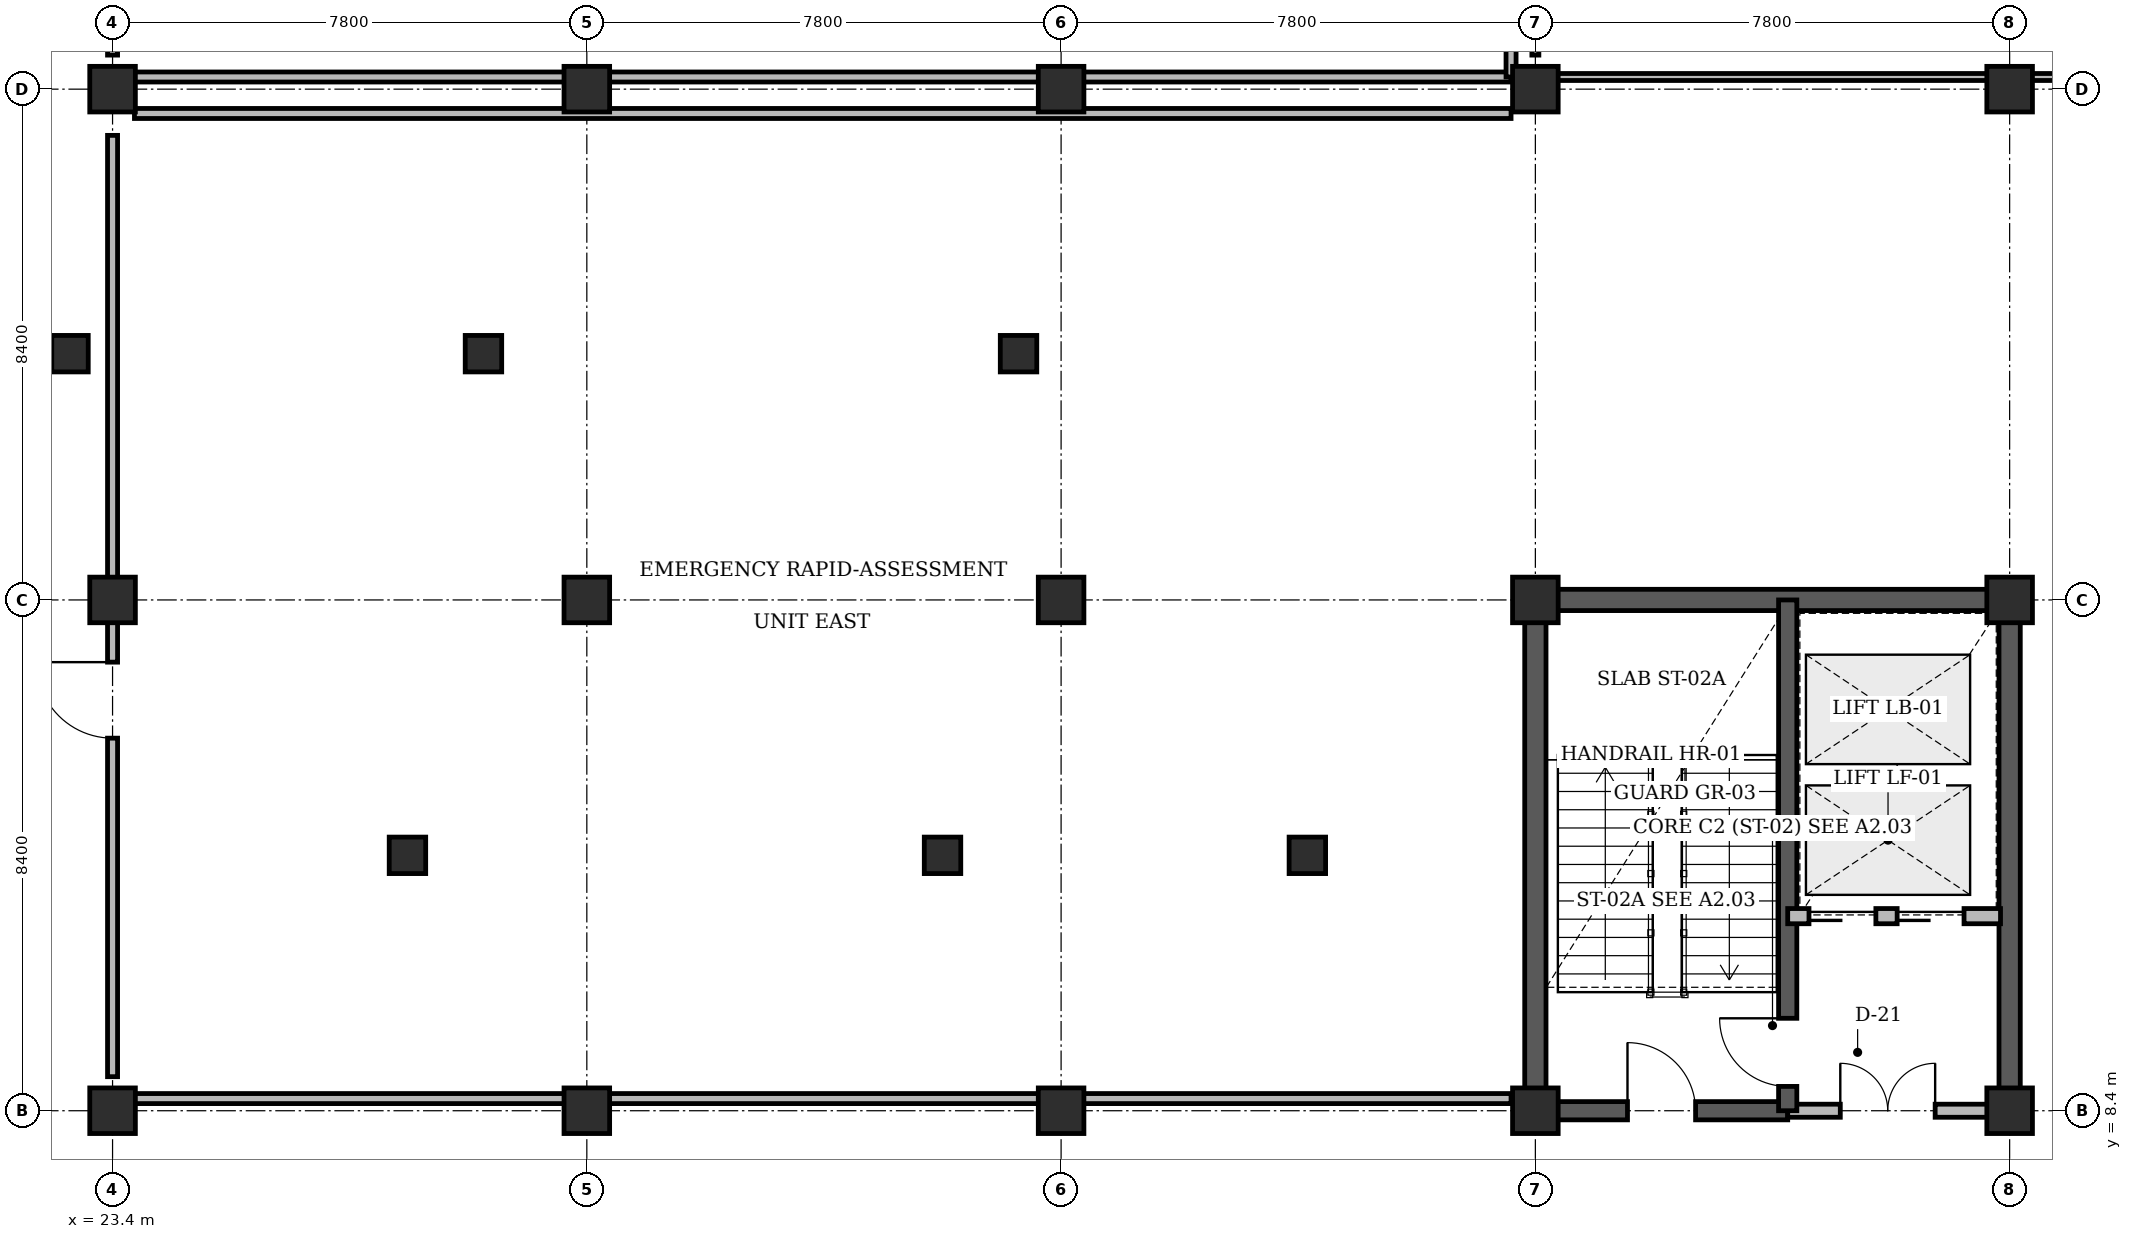
"""IFC4 building model, lengths in metres.
Left out: names, types, materials, properties, quantities, classifications, styles, units other than length and angle.
Written with IfcOpenShell. Run it as: python <this file> out.ifc"""

import sys

from ifc_helpers import new_model, si_unit, direction, frame, frame_2d, origin, origin_2d, place, context, subcontext, project, spatial, rectangle, circle, extrude, element, fill, save


model = new_model("IFC4")
c1 = context("Model", 3, precision=1e-05, world=origin(), true_north=direction((0.0, 1.0)))
c2 = subcontext(c1, "Body", "Model", "MODEL_VIEW")
j1 = project(units=[si_unit("LENGTHUNIT", "METRE"), si_unit("PLANEANGLEUNIT", "RADIAN")], contexts=[c1])
p1 = place(None, origin())
s1 = spatial("IfcSite", under=j1, at=p1, CompositionType="ELEMENT")
p2 = place(p1, origin())
s2 = spatial("IfcBuilding", under=s1, at=p2, CompositionType="ELEMENT")
p3 = place(p2, frame((0.0, 0.0, 4.8)))
s3 = spatial("IfcBuildingStorey", under=s2, at=p3, CompositionType="ELEMENT", Elevation=4.8)
p4 = place(p3, frame((46.625, 16.8, 0.0), z_axis=(0.0, 0.0, 1.0), x_axis=(1.0, 0.0, 0.0)))
e1 = element("IfcWall", 1, at=p4, inside=s3, PredefinedType="SHEAR", context=c2, shape_type="SweptSolid", body=[
    extrude(rectangle(XDim=8.15, YDim=0.35, at=frame_2d((4.075, 0.0))), origin(), (0.0, 0.0, 1.0), 4.48),
])
for number, where, z_axis, x_axis in (
    (2, (46.8, 8.4, 0.0), (0.0, 0.0, 1.0), (0.0, 1.0, 0.0)),
    (3, (54.6, 8.4, 0.0), (0.0, 0.0, 1.0), (0.0, 1.0, 0.0)),
):
    element("IfcWall", number, at=place(p3, frame(where, z_axis=z_axis, x_axis=x_axis)), inside=s3, PredefinedType="SHEAR", context=c2, shape_type="SweptSolid", body=[
        extrude(rectangle(XDim=8.4, YDim=0.35, at=frame_2d((4.2, 0.0))), origin(), (0.0, 0.0, 1.0), 4.48),
    ])
for number, where, z_axis, x_axis in (
    (4, (23.4, 8.4, 0.0), (0.0, 0.0, 1.0), (1.0, 0.0, 0.0)),
    (5, (23.4, 16.8, 0.0), (0.0, 0.0, 1.0), (1.0, 0.0, 0.0)),
    (6, (23.4, 25.2, 0.0), (0.0, 0.0, 1.0), (1.0, 0.0, 0.0)),
    (7, (31.2, 8.4, 0.0), (0.0, 0.0, 1.0), (1.0, 0.0, 0.0)),
    (8, (31.2, 16.8, 0.0), (0.0, 0.0, 1.0), (1.0, 0.0, 0.0)),
    (9, (31.2, 25.2, 0.0), (0.0, 0.0, 1.0), (1.0, 0.0, 0.0)),
    (10, (39.0, 8.4, 0.0), (0.0, 0.0, 1.0), (1.0, 0.0, 0.0)),
    (11, (39.0, 16.8, 0.0), (0.0, 0.0, 1.0), (1.0, 0.0, 0.0)),
    (12, (39.0, 25.2, 0.0), (0.0, 0.0, 1.0), (1.0, 0.0, 0.0)),
    (13, (46.8, 8.4, 0.0), (0.0, 0.0, 1.0), (1.0, 0.0, 0.0)),
    (14, (46.8, 16.8, 0.0), (0.0, 0.0, 1.0), (1.0, 0.0, 0.0)),
    (15, (46.8, 25.2, 0.0), (0.0, 0.0, 1.0), (1.0, 0.0, 0.0)),
    (16, (54.6, 8.4, 0.0), (0.0, 0.0, 1.0), (1.0, 0.0, 0.0)),
    (17, (54.6, 16.8, 0.0), (0.0, 0.0, 1.0), (1.0, 0.0, 0.0)),
    (18, (54.6, 25.2, 0.0), (0.0, 0.0, 1.0), (1.0, 0.0, 0.0)),
):
    element("IfcColumn", number, at=place(p3, frame(where, z_axis=z_axis, x_axis=x_axis)), inside=s3, PredefinedType="COLUMN", context=c2, shape_type="SweptSolid", body=[
        extrude(rectangle(XDim=0.75, YDim=0.75, at=origin_2d()), origin(), (0.0, 0.0, 1.0), 4.8),
    ])
for number, where, z_axis, x_axis in (
    (19, (22.7, 20.85, 0.0), (0.0, 0.0, 1.0), (1.0, 0.0, 0.0)),
    (20, (28.25, 12.6, 0.0), (0.0, 0.0, 1.0), (1.0, 0.0, 0.0)),
    (21, (29.5, 20.85, 0.0), (0.0, 0.0, 1.0), (1.0, 0.0, 0.0)),
    (22, (37.05, 12.6, 0.0), (0.0, 0.0, 1.0), (1.0, 0.0, 0.0)),
    (23, (38.3, 20.85, 0.0), (0.0, 0.0, 1.0), (1.0, 0.0, 0.0)),
    (24, (43.05, 12.6, 0.0), (0.0, 0.0, 1.0), (1.0, 0.0, 0.0)),
):
    element("IfcColumn", number, at=place(p3, frame(where, z_axis=z_axis, x_axis=x_axis)), inside=s3, PredefinedType="PILASTER", context=c2, shape_type="SweptSolid", body=[
        extrude(circle(Radius=0.3, at=origin_2d()), origin(), (0.0, 0.0, 1.0), 4.8),
    ])
p5 = place(p3, frame((46.8, 8.4, 0.0), z_axis=(0.0, 0.0, 1.0), x_axis=(1.0, 0.0, 0.0)))
e25 = element("IfcWall", 25, at=p5, inside=s3, PredefinedType="SHEAR", context=c2, shape_type="SweptSolid", body=[
    extrude(rectangle(XDim=4.15, YDim=0.3, at=frame_2d((2.075, 0.0))), origin(), (0.0, 0.0, 1.0), 4.8),
])
p6 = place(p5, frame((1.515, 0.0, 0.0)))
e26 = element("IfcOpeningElement", 26, at=p6, cuts=e25, PredefinedType="OPENING", context=c2, shape_type="SweptSolid", body=[
    extrude(rectangle(XDim=1.12, YDim=2.15, at=frame_2d((0.56, 1.075))), frame((0.0, 0.16, 0.0), z_axis=(0.0, -1.0, 0.0), x_axis=(1.0, 0.0, 0.0)), (0.0, 0.0, 1.0), 0.32),
])
p7 = place(p3, frame((50.95, 8.4, 0.0), z_axis=(0.0, 0.0, 1.0), x_axis=(1.0, 0.0, 0.0)))
e27 = element("IfcWall", 27, at=p7, inside=s3, PredefinedType="STANDARD", context=c2, shape_type="SweptSolid", body=[
    extrude(rectangle(XDim=3.29, YDim=0.215, at=frame_2d((1.645, 0.0))), origin(), (0.0, 0.0, 1.0), 3.68),
])
p8 = place(p7, frame((0.865, 0.0, 0.0)))
e28 = element("IfcOpeningElement", 28, at=p8, cuts=e27, PredefinedType="OPENING", context=c2, shape_type="SweptSolid", body=[
    extrude(rectangle(XDim=1.56, YDim=2.2, at=frame_2d((0.78, 1.1))), frame((0.0, 0.118, 0.0), z_axis=(0.0, -1.0, 0.0), x_axis=(1.0, 0.0, 0.0)), (0.0, 0.0, 1.0), 0.235),
])
p9 = place(p3, frame((50.95, 8.4, 0.0), z_axis=(0.0, 0.0, 1.0), x_axis=(0.0, 1.0, 0.0)))
e29 = element("IfcWall", 29, at=p9, inside=s3, PredefinedType="SHEAR", context=c2, shape_type="SweptSolid", body=[
    extrude(rectangle(XDim=8.4, YDim=0.3, at=frame_2d((4.2, 0.0))), origin(), (0.0, 0.0, 1.0), 4.8),
])
p10 = place(p9, frame((0.4, 0.0, 0.0)))
e30 = element("IfcOpeningElement", 30, at=p10, cuts=e29, PredefinedType="OPENING", context=c2, shape_type="SweptSolid", body=[
    extrude(rectangle(XDim=1.12, YDim=2.15, at=frame_2d((0.56, 1.075))), frame((0.0, 0.16, 0.0), z_axis=(0.0, -1.0, 0.0), x_axis=(1.0, 0.0, 0.0)), (0.0, 0.0, 1.0), 0.32),
])
p11 = place(p3, frame((50.95, 11.6, 0.0), z_axis=(0.0, 0.0, 1.0), x_axis=(1.0, 0.0, 0.0)))
e31 = element("IfcWall", 31, at=p11, inside=s3, PredefinedType="STANDARD", context=c2, shape_type="SweptSolid", body=[
    extrude(rectangle(XDim=3.5, YDim=0.25, at=frame_2d((1.75, 0.0))), origin(), (0.0, 0.0, 1.0), 4.46),
])
p12 = place(p11, frame((0.35, 0.0, 0.0)))
e32 = element("IfcOpeningElement", 32, at=p12, cuts=e31, PredefinedType="OPENING", context=c2, shape_type="SweptSolid", body=[
    extrude(rectangle(XDim=1.1, YDim=2.2, at=frame_2d((0.55, 1.1))), frame((0.0, 0.135, 0.0), z_axis=(0.0, -1.0, 0.0), x_axis=(1.0, 0.0, 0.0)), (0.0, 0.0, 1.0), 0.27),
])
p13 = place(p11, frame((1.8, 0.0, 0.0)))
e33 = element("IfcOpeningElement", 33, at=p13, cuts=e31, PredefinedType="OPENING", context=c2, shape_type="SweptSolid", body=[
    extrude(rectangle(XDim=1.1, YDim=2.2, at=frame_2d((0.55, 1.1))), frame((0.0, 0.135, 0.0), z_axis=(0.0, -1.0, 0.0), x_axis=(1.0, 0.0, 0.0)), (0.0, 0.0, 1.0), 0.27),
])
p14 = place(p3, frame((23.76, 25.4, 0.0), z_axis=(0.0, 0.0, 1.0), x_axis=(1.0, 0.0, 0.0)))
e34 = element("IfcWall", 34, at=p14, inside=s3, PredefinedType="PARTITIONING", context=c2, shape_type="SweptSolid", body=[
    extrude(rectangle(XDim=22.64, YDim=0.165, at=frame_2d((11.32, 0.0))), origin(), (0.0, 0.0, 1.0), 3.68),
])
p15 = place(p3, frame((23.4, 25.76, 0.0), z_axis=(0.0, 0.0, 1.0), x_axis=(0.0, 1.0, 0.0)))
e35 = element("IfcWall", 35, at=p15, inside=s3, PredefinedType="PARTITIONING", context=c2, shape_type="SweptSolid", body=[
    extrude(rectangle(XDim=21.24, YDim=0.165, at=frame_2d((10.62, 0.0))), origin(), (0.0, 0.0, 1.0), 3.665),
])
p16 = place(p3, frame((46.4, 25.4, 0.0), z_axis=(0.0, 0.0, 1.0), x_axis=(0.0, 1.0, 0.0)))
e36 = element("IfcWall", 36, at=p16, inside=s3, PredefinedType="PARTITIONING", context=c2, shape_type="SweptSolid", body=[
    extrude(rectangle(XDim=21.6, YDim=0.165, at=frame_2d((10.8, 0.0))), origin(), (0.0, 0.0, 1.0), 3.68),
])
for number, where, z_axis, x_axis in (
    (37, (23.76, 8.6, 0.0), (0.0, 0.0, 1.0), (1.0, 0.0, 0.0)),
    (38, (23.76, 24.8, 0.0), (0.0, 0.0, 1.0), (1.0, 0.0, 0.0)),
):
    element("IfcWall", number, at=place(p3, frame(where, z_axis=z_axis, x_axis=x_axis)), inside=s3, PredefinedType="PARTITIONING", context=c2, shape_type="SweptSolid", body=[
        extrude(rectangle(XDim=22.64, YDim=0.165, at=frame_2d((11.32, 0.0))), origin(), (0.0, 0.0, 1.0), 3.68),
    ])
p17 = place(p3, frame((23.4, 8.96, 0.0), z_axis=(0.0, 0.0, 1.0), x_axis=(0.0, 1.0, 0.0)))
e39 = element("IfcWall", 39, at=p17, inside=s3, PredefinedType="PARTITIONING", context=c2, shape_type="SweptSolid", body=[
    extrude(rectangle(XDim=15.48, YDim=0.165, at=frame_2d((7.74, 0.0))), origin(), (0.0, 0.0, 1.0), 3.665),
])
p18 = place(p17, frame((5.567, 0.0, 0.0)))
e40 = element("IfcOpeningElement", 40, at=p18, cuts=e39, PredefinedType="OPENING", context=c2, shape_type="SweptSolid", body=[
    extrude(rectangle(XDim=1.25, YDim=2.15, at=frame_2d((0.625, 1.075))), frame((0.0, 0.093, 0.0), z_axis=(0.0, -1.0, 0.0), x_axis=(1.0, 0.0, 0.0)), (0.0, 0.0, 1.0), 0.185),
])
p19 = place(p3, frame((47.16, 25.4, 0.0), z_axis=(0.0, 0.0, 1.0), x_axis=(1.0, 0.0, 0.0)))
e41 = element("IfcWall", 41, at=p19, inside=s3, PredefinedType="PARTITIONING", context=c2, shape_type="SweptSolid", body=[
    extrude(rectangle(XDim=9.24, YDim=0.115, at=frame_2d((4.62, 0.0))), origin(), (0.0, 0.0, 1.0), 3.68),
])
p20 = place(p3, frame((46.8, 25.76, 0.0), z_axis=(0.0, 0.0, 1.0), x_axis=(0.0, 1.0, 0.0)))
e42 = element("IfcWall", 42, at=p20, inside=s3, PredefinedType="PARTITIONING", context=c2, shape_type="SweptSolid", body=[
    extrude(rectangle(XDim=57.48, YDim=0.115, at=frame_2d((28.74, 0.0))), origin(), (0.0, 0.0, 1.0), 3.665),
])
p21 = place(p6, origin())
e43 = element("IfcDoor", 43, at=p21, inside=s3, OperationType="SINGLE_SWING_LEFT", PredefinedType="DOOR", context=c2, shape_type="SweptSolid", body=[
    extrude(rectangle(XDim=1.12, YDim=2.15, at=frame_2d((0.56, 1.075))), frame((0.0, 0.025, 0.0), z_axis=(0.0, -1.0, 0.0), x_axis=(1.0, 0.0, 0.0)), (0.0, 0.0, 1.0), 0.05),
])
fill(e26, e43)
p22 = place(p8, origin())
e44 = element("IfcDoor", 44, at=p22, inside=s3, OperationType="DOUBLE_DOOR_SINGLE_SWING", PredefinedType="DOOR", context=c2, shape_type="SweptSolid", body=[
    extrude(rectangle(XDim=1.56, YDim=2.2, at=frame_2d((0.78, 1.1))), frame((0.0, 0.025, 0.0), z_axis=(0.0, -1.0, 0.0), x_axis=(1.0, 0.0, 0.0)), (0.0, 0.0, 1.0), 0.05),
])
fill(e28, e44)
p23 = place(p10, origin())
e45 = element("IfcDoor", 45, at=p23, inside=s3, OperationType="SINGLE_SWING_RIGHT", PredefinedType="DOOR", context=c2, shape_type="SweptSolid", body=[
    extrude(rectangle(XDim=1.12, YDim=2.15, at=frame_2d((0.56, 1.075))), frame((0.0, 0.025, 0.0), z_axis=(0.0, -1.0, 0.0), x_axis=(1.0, 0.0, 0.0)), (0.0, 0.0, 1.0), 0.05),
])
fill(e30, e45)
p24 = place(p12, origin())
e46 = element("IfcDoor", 46, at=p24, inside=s3, OperationType="SLIDING_TO_LEFT", PredefinedType="DOOR", context=c2, shape_type="SweptSolid", body=[
    extrude(rectangle(XDim=1.1, YDim=2.2, at=frame_2d((0.55, 1.1))), frame((0.0, 0.025, 0.0), z_axis=(0.0, -1.0, 0.0), x_axis=(1.0, 0.0, 0.0)), (0.0, 0.0, 1.0), 0.05),
])
fill(e32, e46)
p25 = place(p13, origin())
e47 = element("IfcDoor", 47, at=p25, inside=s3, OperationType="SLIDING_TO_LEFT", PredefinedType="DOOR", context=c2, shape_type="SweptSolid", body=[
    extrude(rectangle(XDim=1.1, YDim=2.2, at=frame_2d((0.55, 1.1))), frame((0.0, 0.025, 0.0), z_axis=(0.0, -1.0, 0.0), x_axis=(1.0, 0.0, 0.0)), (0.0, 0.0, 1.0), 0.05),
])
fill(e33, e47)
p26 = place(p18, origin())
e48 = element("IfcDoor", 48, at=p26, inside=s3, OperationType="SINGLE_SWING_RIGHT", PredefinedType="DOOR", context=c2, shape_type="SweptSolid", body=[
    extrude(rectangle(XDim=1.25, YDim=2.15, at=frame_2d((0.625, 1.075))), frame((0.0, 0.025, 0.0), z_axis=(0.0, -1.0, 0.0), x_axis=(1.0, 0.0, 0.0)), (0.0, 0.0, 1.0), 0.05),
])
fill(e40, e48)
save(model, sys.argv[1])
